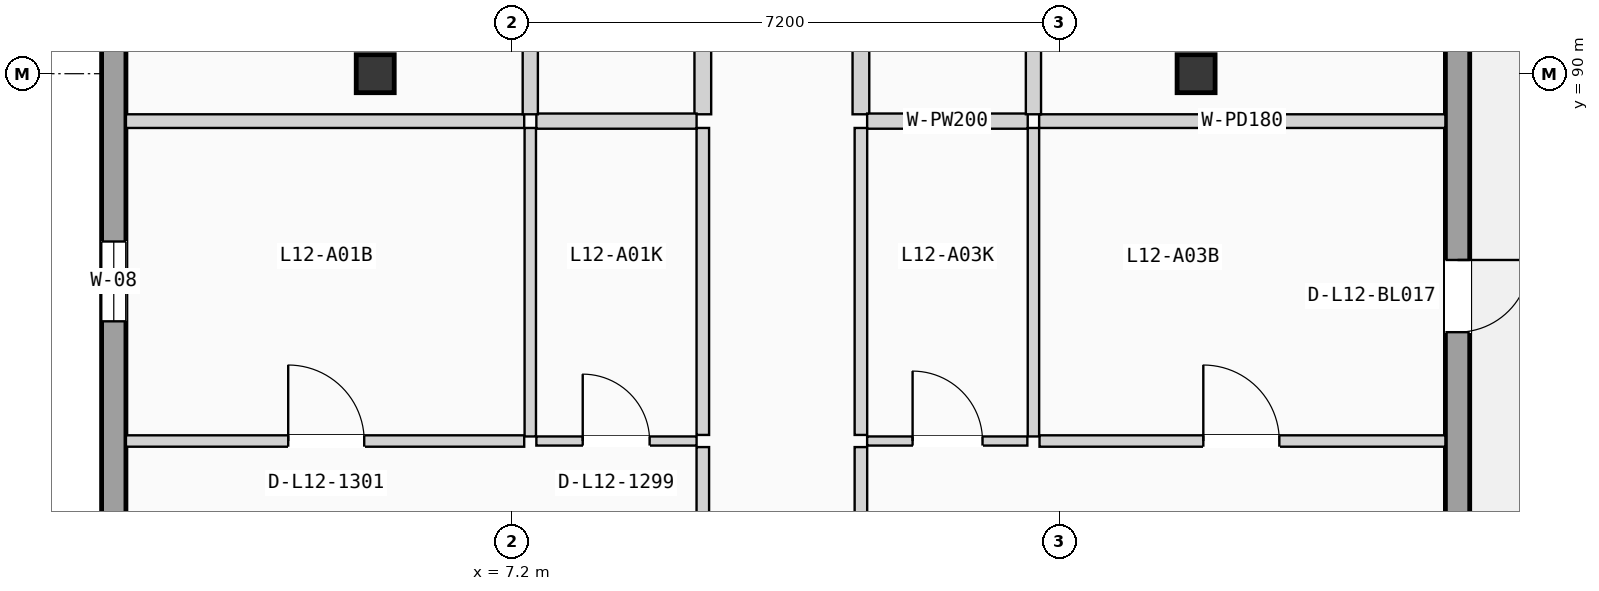
"""IFC4 building model, lengths in metres.
Left out: names, types, materials, properties, quantities, classifications, styles, units other than length and angle.
Written with IfcOpenShell. Run it as: python <this file> out.ifc"""

import sys

from ifc_helpers import new_model, si_unit, direction, frame, frame_2d, origin, origin_2d, place, context, subcontext, project, spatial, rectangle, extrude, element, fill, save


model = new_model("IFC4")
c1 = context("Model", 3, precision=1e-05, world=origin(), true_north=direction((0.0, 1.0)))
c2 = subcontext(c1, "Body", "Model", "MODEL_VIEW")
j1 = project(units=[si_unit("LENGTHUNIT", "METRE"), si_unit("PLANEANGLEUNIT", "RADIAN")], contexts=[c1])
p1 = place(None, origin())
s1 = spatial("IfcSite", under=j1, at=p1, CompositionType="ELEMENT")
p2 = place(p1, origin())
s2 = spatial("IfcBuilding", under=s1, at=p2, CompositionType="ELEMENT")
p3 = place(p2, frame((0.0, 0.0, 40.425)))
s3 = spatial("IfcBuildingStorey", under=s2, at=p3, CompositionType="ELEMENT", Elevation=40.425)
for number, where, z_axis, x_axis in (
    (1, (5.4, 90.0, 0.0), (0.0, 0.0, 1.0), (1.0, 0.0, 0.0)),
    (2, (16.2, 90.0, 0.0), (0.0, 0.0, 1.0), (1.0, 0.0, 0.0)),
):
    element("IfcColumn", number, at=place(p3, frame(where, z_axis=z_axis, x_axis=x_axis)), inside=s3, PredefinedType="COLUMN", context=c2, shape_type="SweptSolid", body=[
        extrude(rectangle(XDim=0.5, YDim=0.5, at=origin_2d()), origin(), (0.0, 0.0, 1.0), 3.15),
    ])
p4 = place(p3, frame((1.96, 68.72, 0.0), z_axis=(0.0, 0.0, 1.0), x_axis=(0.0, 1.0, 0.0)))
e3 = element("IfcWall", 3, at=p4, inside=s3, PredefinedType="SOLIDWALL", context=c2, shape_type="SweptSolid", body=[
    extrude(rectangle(XDim=49.76, YDim=0.32, at=frame_2d((24.88, 0.0))), origin(), (0.0, 0.0, 1.0), 2.89),
])
p5 = place(p4, frame((12.119, 0.0, 0.9)))
e4 = element("IfcOpeningElement", 4, at=p5, cuts=e3, PredefinedType="OPENING", context=c2, shape_type="SweptSolid", body=[
    extrude(rectangle(XDim=1.05, YDim=1.2, at=frame_2d((0.525, 0.6))), frame((0.0, 0.17, 0.0), z_axis=(0.0, -1.0, 0.0), x_axis=(1.0, 0.0, 0.0)), (0.0, 0.0, 1.0), 0.34),
])
p6 = place(p4, frame((8.774, 0.0, 0.855)))
e5 = element("IfcOpeningElement", 5, at=p6, cuts=e3, PredefinedType="OPENING", context=c2, shape_type="SweptSolid", body=[
    extrude(rectangle(XDim=1.05, YDim=1.35, at=frame_2d((0.525, 0.675))), frame((0.0, 0.17, 0.0), z_axis=(0.0, -1.0, 0.0), x_axis=(1.0, 0.0, 0.0)), (0.0, 0.0, 1.0), 0.34),
])
p7 = place(p4, frame((18.022, 0.0, 0.705)))
e6 = element("IfcOpeningElement", 6, at=p7, cuts=e3, PredefinedType="OPENING", context=c2, shape_type="SweptSolid", body=[
    extrude(rectangle(XDim=1.05, YDim=1.5, at=frame_2d((0.525, 0.75))), frame((0.0, 0.17, 0.0), z_axis=(0.0, -1.0, 0.0), x_axis=(1.0, 0.0, 0.0)), (0.0, 0.0, 1.0), 0.34),
])
p8 = place(p4, frame((31.555, 0.0, 0.555)))
e7 = element("IfcOpeningElement", 7, at=p8, cuts=e3, PredefinedType="OPENING", context=c2, shape_type="SweptSolid", body=[
    extrude(rectangle(XDim=1.05, YDim=1.65, at=frame_2d((0.525, 0.825))), frame((0.0, 0.17, 0.0), z_axis=(0.0, -1.0, 0.0), x_axis=(1.0, 0.0, 0.0)), (0.0, 0.0, 1.0), 0.34),
])
p9 = place(p4, frame((24.002, 0.0, 0.85)))
e8 = element("IfcOpeningElement", 8, at=p9, cuts=e3, PredefinedType="OPENING", context=c2, shape_type="SweptSolid", body=[
    extrude(rectangle(XDim=0.95, YDim=1.2, at=frame_2d((0.475, 0.6))), frame((0.0, 0.17, 0.0), z_axis=(0.0, -1.0, 0.0), x_axis=(1.0, 0.0, 0.0)), (0.0, 0.0, 1.0), 0.34),
])
p10 = place(p4, frame((39.02, 0.0, 0.9)))
e9 = element("IfcOpeningElement", 9, at=p10, cuts=e3, PredefinedType="OPENING", context=c2, shape_type="SweptSolid", body=[
    extrude(rectangle(XDim=1.15, YDim=1.2, at=frame_2d((0.575, 0.6))), frame((0.0, 0.17, 0.0), z_axis=(0.0, -1.0, 0.0), x_axis=(1.0, 0.0, 0.0)), (0.0, 0.0, 1.0), 0.34),
])
p11 = place(p3, frame((19.64, 68.72, 0.0), z_axis=(0.0, 0.0, 1.0), x_axis=(0.0, 1.0, 0.0)))
e10 = element("IfcWall", 10, at=p11, inside=s3, PredefinedType="SOLIDWALL", context=c2, shape_type="SweptSolid", body=[
    extrude(rectangle(XDim=49.76, YDim=0.32, at=frame_2d((24.88, 0.0))), origin(), (0.0, 0.0, 1.0), 2.89),
])
p12 = place(p11, frame((12.069, 0.0, 0.855)))
e11 = element("IfcOpeningElement", 11, at=p12, cuts=e10, PredefinedType="OPENING", context=c2, shape_type="SweptSolid", body=[
    extrude(rectangle(XDim=1.15, YDim=1.35, at=frame_2d((0.575, 0.675))), frame((0.0, 0.17, 0.0), z_axis=(0.0, -1.0, 0.0), x_axis=(1.0, 0.0, 0.0)), (0.0, 0.0, 1.0), 0.34),
])
p13 = place(p11, frame((8.724, 0.0, 0.705)))
e12 = element("IfcOpeningElement", 12, at=p13, cuts=e10, PredefinedType="OPENING", context=c2, shape_type="SweptSolid", body=[
    extrude(rectangle(XDim=1.15, YDim=1.5, at=frame_2d((0.575, 0.75))), frame((0.0, 0.17, 0.0), z_axis=(0.0, -1.0, 0.0), x_axis=(1.0, 0.0, 0.0)), (0.0, 0.0, 1.0), 0.34),
])
p14 = place(p11, frame((17.879, 0.0, 0.0)))
e13 = element("IfcOpeningElement", 13, at=p14, cuts=e10, PredefinedType="OPENING", context=c2, shape_type="SweptSolid", body=[
    extrude(rectangle(XDim=0.95, YDim=2.15, at=frame_2d((0.475, 1.075))), frame((0.0, 0.17, 0.0), z_axis=(0.0, -1.0, 0.0), x_axis=(1.0, 0.0, 0.0)), (0.0, 0.0, 1.0), 0.34),
])
p15 = place(p11, frame((31.505, 0.0, 0.555)))
e14 = element("IfcOpeningElement", 14, at=p15, cuts=e10, PredefinedType="OPENING", context=c2, shape_type="SweptSolid", body=[
    extrude(rectangle(XDim=1.15, YDim=1.65, at=frame_2d((0.575, 0.825))), frame((0.0, 0.17, 0.0), z_axis=(0.0, -1.0, 0.0), x_axis=(1.0, 0.0, 0.0)), (0.0, 0.0, 1.0), 0.34),
])
p16 = place(p11, frame((24.002, 0.0, 0.85)))
e15 = element("IfcOpeningElement", 15, at=p16, cuts=e10, PredefinedType="OPENING", context=c2, shape_type="SweptSolid", body=[
    extrude(rectangle(XDim=0.95, YDim=1.2, at=frame_2d((0.475, 0.6))), frame((0.0, 0.17, 0.0), z_axis=(0.0, -1.0, 0.0), x_axis=(1.0, 0.0, 0.0)), (0.0, 0.0, 1.0), 0.34),
])
p17 = place(p11, frame((38.97, 0.0, 0.9)))
e16 = element("IfcOpeningElement", 16, at=p17, cuts=e10, PredefinedType="OPENING", context=c2, shape_type="SweptSolid", body=[
    extrude(rectangle(XDim=1.25, YDim=1.2, at=frame_2d((0.625, 0.6))), frame((0.0, 0.17, 0.0), z_axis=(0.0, -1.0, 0.0), x_axis=(1.0, 0.0, 0.0)), (0.0, 0.0, 1.0), 0.34),
])
p18 = place(p3, frame((9.71, 80.199, 0.0), z_axis=(0.0, 0.0, 1.0), x_axis=(0.0, 1.0, 0.0)))
e17 = element("IfcWall", 17, at=p18, inside=s3, PredefinedType="PARTITIONING", context=c2, shape_type="SweptSolid", body=[
    extrude(rectangle(XDim=4.888, YDim=0.165, at=frame_2d((2.444, 0.0))), origin(), (0.0, 0.0, 1.0), 2.87),
])
p19 = place(p18, frame((1.954, 0.0, 0.0)))
e18 = element("IfcOpeningElement", 18, at=p19, cuts=e17, PredefinedType="OPENING", context=c2, shape_type="SweptSolid", body=[
    extrude(rectangle(XDim=0.98, YDim=2.08, at=frame_2d((0.49, 1.04))), frame((0.0, 0.093, 0.0), z_axis=(0.0, -1.0, 0.0), x_axis=(1.0, 0.0, 0.0)), (0.0, 0.0, 1.0), 0.185),
])
p20 = place(p3, frame((9.71, 85.247, 0.0), z_axis=(0.0, 0.0, 1.0), x_axis=(0.0, 1.0, 0.0)))
e19 = element("IfcWall", 19, at=p20, inside=s3, PredefinedType="PARTITIONING", context=c2, shape_type="SweptSolid", body=[
    extrude(rectangle(XDim=4.039, YDim=0.165, at=frame_2d((2.02, 0.0))), origin(), (0.0, 0.0, 1.0), 2.87),
])
p21 = place(p3, frame((9.71, 89.466, 0.0), z_axis=(0.0, 0.0, 1.0), x_axis=(0.0, 1.0, 0.0)))
e20 = element("IfcWall", 20, at=p21, inside=s3, PredefinedType="PLUMBINGWALL", context=c2, shape_type="SweptSolid", body=[
    extrude(rectangle(XDim=6.658, YDim=0.22, at=frame_2d((3.329, 0.0))), origin(), (0.0, 0.0, 1.0), 2.87),
])
p22 = place(p3, frame((11.79, 80.199, 0.0), z_axis=(0.0, 0.0, 1.0), x_axis=(0.0, 1.0, 0.0)))
e21 = element("IfcWall", 21, at=p22, inside=s3, PredefinedType="PARTITIONING", context=c2, shape_type="SweptSolid", body=[
    extrude(rectangle(XDim=4.888, YDim=0.165, at=frame_2d((2.444, 0.0))), origin(), (0.0, 0.0, 1.0), 2.87),
])
p23 = place(p22, frame((1.954, 0.0, 0.0)))
e22 = element("IfcOpeningElement", 22, at=p23, cuts=e21, PredefinedType="OPENING", context=c2, shape_type="SweptSolid", body=[
    extrude(rectangle(XDim=0.98, YDim=2.08, at=frame_2d((0.49, 1.04))), frame((0.0, 0.093, 0.0), z_axis=(0.0, -1.0, 0.0), x_axis=(1.0, 0.0, 0.0)), (0.0, 0.0, 1.0), 0.185),
])
p24 = place(p3, frame((11.79, 85.247, 0.0), z_axis=(0.0, 0.0, 1.0), x_axis=(0.0, 1.0, 0.0)))
e23 = element("IfcWall", 23, at=p24, inside=s3, PredefinedType="PARTITIONING", context=c2, shape_type="SweptSolid", body=[
    extrude(rectangle(XDim=4.039, YDim=0.165, at=frame_2d((2.02, 0.0))), origin(), (0.0, 0.0, 1.0), 2.87),
])
p25 = place(p3, frame((11.79, 89.466, 0.0), z_axis=(0.0, 0.0, 1.0), x_axis=(0.0, 1.0, 0.0)))
e24 = element("IfcWall", 24, at=p25, inside=s3, PredefinedType="PLUMBINGWALL", context=c2, shape_type="SweptSolid", body=[
    extrude(rectangle(XDim=6.658, YDim=0.22, at=frame_2d((3.329, 0.0))), origin(), (0.0, 0.0, 1.0), 2.87),
])
p26 = place(p3, frame((7.52, 85.167, 0.0), z_axis=(0.0, 0.0, 1.0), x_axis=(1.0, 0.0, 0.0)))
e25 = element("IfcWall", 25, at=p26, inside=s3, PredefinedType="PARTITIONING", context=c2, shape_type="SweptSolid", body=[
    extrude(rectangle(XDim=2.108, YDim=0.12, at=frame_2d((1.054, 0.0))), origin(), (0.0, 0.0, 1.0), 2.87),
])
p27 = place(p26, frame((0.61, 0.0, 0.0)))
e26 = element("IfcOpeningElement", 26, at=p27, cuts=e25, PredefinedType="OPENING", context=c2, shape_type="SweptSolid", body=[
    extrude(rectangle(XDim=0.88, YDim=2.02, at=frame_2d((0.44, 1.01))), frame((0.0, 0.07, 0.0), z_axis=(0.0, -1.0, 0.0), x_axis=(1.0, 0.0, 0.0)), (0.0, 0.0, 1.0), 0.14),
])
p28 = place(p3, frame((2.12, 85.167, 0.0), z_axis=(0.0, 0.0, 1.0), x_axis=(1.0, 0.0, 0.0)))
e27 = element("IfcWall", 27, at=p28, inside=s3, PredefinedType="PARTITIONING", context=c2, shape_type="SweptSolid", body=[
    extrude(rectangle(XDim=5.24, YDim=0.15, at=frame_2d((2.62, 0.0))), origin(), (0.0, 0.0, 1.0), 2.87),
])
p29 = place(p28, frame((2.135, 0.0, 0.0)))
e28 = element("IfcOpeningElement", 28, at=p29, cuts=e27, PredefinedType="OPENING", context=c2, shape_type="SweptSolid", body=[
    extrude(rectangle(XDim=1.0, YDim=2.06, at=frame_2d((0.5, 1.03))), frame((0.0, 0.085, 0.0), z_axis=(0.0, -1.0, 0.0), x_axis=(1.0, 0.0, 0.0)), (0.0, 0.0, 1.0), 0.17),
])
p30 = place(p3, frame((7.44, 85.227, 0.0), z_axis=(0.0, 0.0, 1.0), x_axis=(0.0, 1.0, 0.0)))
e29 = element("IfcWall", 29, at=p30, inside=s3, PredefinedType="PARTITIONING", context=c2, shape_type="SweptSolid", body=[
    extrude(rectangle(XDim=4.059, YDim=0.15, at=frame_2d((2.029, 0.0))), origin(), (0.0, 0.0, 1.0), 2.87),
])
p31 = place(p3, frame((7.52, 89.376, 0.0), z_axis=(0.0, 0.0, 1.0), x_axis=(1.0, 0.0, 0.0)))
e30 = element("IfcWall", 30, at=p31, inside=s3, PredefinedType="PLUMBINGWALL", context=c2, shape_type="SweptSolid", body=[
    extrude(rectangle(XDim=2.108, YDim=0.2, at=frame_2d((1.054, 0.0))), origin(), (0.0, 0.0, 1.0), 2.87),
])
p32 = place(p3, frame((2.12, 89.376, 0.0), z_axis=(0.0, 0.0, 1.0), x_axis=(1.0, 0.0, 0.0)))
e31 = element("IfcWall", 31, at=p32, inside=s3, PredefinedType="PARTITIONING", context=c2, shape_type="SweptSolid", body=[
    extrude(rectangle(XDim=5.24, YDim=0.18, at=frame_2d((2.62, 0.0))), origin(), (0.0, 0.0, 1.0), 2.87),
])
p33 = place(p3, frame((7.44, 89.466, 0.0), z_axis=(0.0, 0.0, 1.0), x_axis=(0.0, 1.0, 0.0)))
e32 = element("IfcWall", 32, at=p33, inside=s3, PredefinedType="PLUMBINGWALL", context=c2, shape_type="SweptSolid", body=[
    extrude(rectangle(XDim=6.658, YDim=0.2, at=frame_2d((3.329, 0.0))), origin(), (0.0, 0.0, 1.0), 2.87),
])
p34 = place(p3, frame((11.872, 85.167, 0.0), z_axis=(0.0, 0.0, 1.0), x_axis=(1.0, 0.0, 0.0)))
e33 = element("IfcWall", 33, at=p34, inside=s3, PredefinedType="PARTITIONING", context=c2, shape_type="SweptSolid", body=[
    extrude(rectangle(XDim=2.108, YDim=0.12, at=frame_2d((1.054, 0.0))), origin(), (0.0, 0.0, 1.0), 2.87),
])
p35 = place(p34, frame((0.598, 0.0, 0.0)))
e34 = element("IfcOpeningElement", 34, at=p35, cuts=e33, PredefinedType="OPENING", context=c2, shape_type="SweptSolid", body=[
    extrude(rectangle(XDim=0.92, YDim=2.02, at=frame_2d((0.46, 1.01))), frame((0.0, 0.07, 0.0), z_axis=(0.0, -1.0, 0.0), x_axis=(1.0, 0.0, 0.0)), (0.0, 0.0, 1.0), 0.14),
])
p36 = place(p3, frame((14.14, 85.167, 0.0), z_axis=(0.0, 0.0, 1.0), x_axis=(1.0, 0.0, 0.0)))
e35 = element("IfcWall", 35, at=p36, inside=s3, PredefinedType="PARTITIONING", context=c2, shape_type="SweptSolid", body=[
    extrude(rectangle(XDim=5.34, YDim=0.15, at=frame_2d((2.67, 0.0))), origin(), (0.0, 0.0, 1.0), 2.87),
])
p37 = place(p36, frame((2.155, 0.0, 0.0)))
e36 = element("IfcOpeningElement", 36, at=p37, cuts=e35, PredefinedType="OPENING", context=c2, shape_type="SweptSolid", body=[
    extrude(rectangle(XDim=1.0, YDim=2.06, at=frame_2d((0.5, 1.03))), frame((0.0, 0.085, 0.0), z_axis=(0.0, -1.0, 0.0), x_axis=(1.0, 0.0, 0.0)), (0.0, 0.0, 1.0), 0.17),
])
p38 = place(p3, frame((14.06, 85.227, 0.0), z_axis=(0.0, 0.0, 1.0), x_axis=(0.0, 1.0, 0.0)))
e37 = element("IfcWall", 37, at=p38, inside=s3, PredefinedType="PARTITIONING", context=c2, shape_type="SweptSolid", body=[
    extrude(rectangle(XDim=4.059, YDim=0.15, at=frame_2d((2.029, 0.0))), origin(), (0.0, 0.0, 1.0), 2.87),
])
p39 = place(p3, frame((11.872, 89.376, 0.0), z_axis=(0.0, 0.0, 1.0), x_axis=(1.0, 0.0, 0.0)))
e38 = element("IfcWall", 38, at=p39, inside=s3, PredefinedType="PLUMBINGWALL", context=c2, shape_type="SweptSolid", body=[
    extrude(rectangle(XDim=2.113, YDim=0.2, at=frame_2d((1.057, 0.0))), origin(), (0.0, 0.0, 1.0), 2.87),
])
p40 = place(p3, frame((14.135, 89.376, 0.0), z_axis=(0.0, 0.0, 1.0), x_axis=(1.0, 0.0, 0.0)))
e39 = element("IfcWall", 39, at=p40, inside=s3, PredefinedType="PARTITIONING", context=c2, shape_type="SweptSolid", body=[
    extrude(rectangle(XDim=5.345, YDim=0.18, at=frame_2d((2.672, 0.0))), origin(), (0.0, 0.0, 1.0), 2.87),
])
p41 = place(p3, frame((14.06, 89.466, 0.0), z_axis=(0.0, 0.0, 1.0), x_axis=(0.0, 1.0, 0.0)))
e40 = element("IfcWall", 40, at=p41, inside=s3, PredefinedType="PLUMBINGWALL", context=c2, shape_type="SweptSolid", body=[
    extrude(rectangle(XDim=6.658, YDim=0.2, at=frame_2d((3.329, 0.0))), origin(), (0.0, 0.0, 1.0), 2.87),
])
p42 = place(p7, origin())
e41 = element("IfcWindow", 41, at=p42, inside=s3, PartitioningType="SINGLE_PANEL", PredefinedType="WINDOW", context=c2, shape_type="SweptSolid", body=[
    extrude(rectangle(XDim=1.05, YDim=1.5, at=frame_2d((0.525, 0.75))), frame((0.0, 0.03, 0.0), z_axis=(0.0, -1.0, 0.0), x_axis=(1.0, 0.0, 0.0)), (0.0, 0.0, 1.0), 0.06),
])
fill(e6, e41)
p43 = place(p14, frame((0.95, 0.0, 0.0), z_axis=(0.0, 0.0, 1.0), x_axis=(-1.0, 0.0, 0.0)))
e42 = element("IfcDoor", 42, at=p43, inside=s3, OperationType="SINGLE_SWING_RIGHT", PredefinedType="DOOR", context=c2, shape_type="SweptSolid", body=[
    extrude(rectangle(XDim=0.95, YDim=2.15, at=frame_2d((0.475, 1.075))), frame((0.0, 0.025, 0.0), z_axis=(0.0, -1.0, 0.0), x_axis=(1.0, 0.0, 0.0)), (0.0, 0.0, 1.0), 0.05),
])
fill(e13, e42)
p44 = place(p27, origin())
e43 = element("IfcDoor", 43, at=p44, inside=s3, OperationType="SINGLE_SWING_LEFT", PredefinedType="DOOR", context=c2, shape_type="SweptSolid", body=[
    extrude(rectangle(XDim=0.88, YDim=2.02, at=frame_2d((0.44, 1.01))), frame((0.0, 0.025, 0.0), z_axis=(0.0, -1.0, 0.0), x_axis=(1.0, 0.0, 0.0)), (0.0, 0.0, 1.0), 0.05),
])
fill(e26, e43)
p45 = place(p29, origin())
e44 = element("IfcDoor", 44, at=p45, inside=s3, OperationType="SINGLE_SWING_LEFT", PredefinedType="DOOR", context=c2, shape_type="SweptSolid", body=[
    extrude(rectangle(XDim=1.0, YDim=2.06, at=frame_2d((0.5, 1.03))), frame((0.0, 0.025, 0.0), z_axis=(0.0, -1.0, 0.0), x_axis=(1.0, 0.0, 0.0)), (0.0, 0.0, 1.0), 0.05),
])
fill(e28, e44)
p46 = place(p35, origin())
e45 = element("IfcDoor", 45, at=p46, inside=s3, OperationType="SINGLE_SWING_LEFT", PredefinedType="DOOR", context=c2, shape_type="SweptSolid", body=[
    extrude(rectangle(XDim=0.92, YDim=2.02, at=frame_2d((0.46, 1.01))), frame((0.0, 0.025, 0.0), z_axis=(0.0, -1.0, 0.0), x_axis=(1.0, 0.0, 0.0)), (0.0, 0.0, 1.0), 0.05),
])
fill(e34, e45)
p47 = place(p37, origin())
e46 = element("IfcDoor", 46, at=p47, inside=s3, OperationType="SINGLE_SWING_LEFT", PredefinedType="DOOR", context=c2, shape_type="SweptSolid", body=[
    extrude(rectangle(XDim=1.0, YDim=2.06, at=frame_2d((0.5, 1.03))), frame((0.0, 0.025, 0.0), z_axis=(0.0, -1.0, 0.0), x_axis=(1.0, 0.0, 0.0)), (0.0, 0.0, 1.0), 0.05),
])
fill(e36, e46)
save(model, sys.argv[1])
